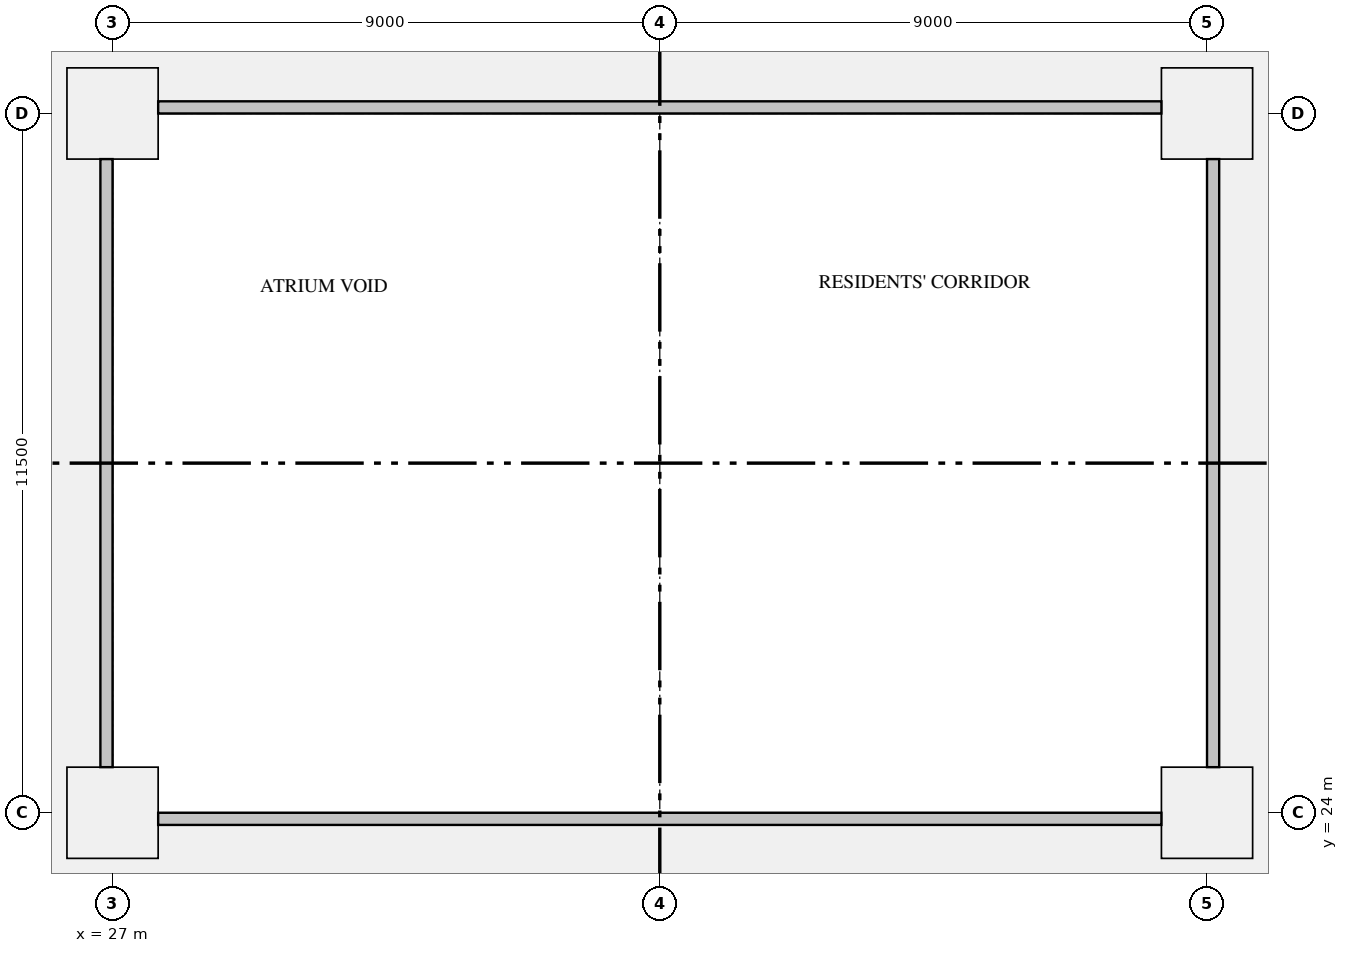
"""IFC4 building model, lengths in metres.
Left out: names, types, materials, properties, quantities, classifications, styles, units other than length and angle.
Written with IfcOpenShell. Run it as: python <this file> out.ifc"""

import sys

from ifc_helpers import new_model, si_unit, direction, frame, origin, origin_2d, place, context, subcontext, project, spatial, rectangle, extrude, element, save


model = new_model("IFC4")
c1 = context("Model", 3, precision=1e-05, world=origin(), true_north=direction((0.0, 1.0)))
c2 = subcontext(c1, "Body", "Model", "MODEL_VIEW")
j1 = project(units=[si_unit("LENGTHUNIT", "METRE"), si_unit("PLANEANGLEUNIT", "RADIAN")], contexts=[c1])
p1 = place(None, origin())
s1 = spatial("IfcSite", under=j1, at=p1, CompositionType="ELEMENT")
p2 = place(p1, origin())
s2 = spatial("IfcBuilding", under=s1, at=p2, CompositionType="ELEMENT")
p3 = place(p2, frame((0.0, 0.0, 66.75)))
s3 = spatial("IfcBuildingStorey", under=s2, at=p3, CompositionType="ELEMENT", Elevation=66.75)
for number, where, z_axis, x_axis in (
    (1, (27.0, 24.0, 0.0), (0.0, 0.0, 1.0), (1.0, 0.0, 0.0)),
    (2, (45.0, 24.0, 0.0), (0.0, 0.0, 1.0), (1.0, 0.0, 0.0)),
    (3, (27.0, 35.5, 0.0), (0.0, 0.0, 1.0), (1.0, 0.0, 0.0)),
    (4, (45.0, 35.5, 0.0), (0.0, 0.0, 1.0), (1.0, 0.0, 0.0)),
):
    element("IfcColumn", number, at=place(p3, frame(where, z_axis=z_axis, x_axis=x_axis)), inside=s3, PredefinedType="COLUMN", context=c2, shape_type="SweptSolid", body=[
        extrude(rectangle(XDim=1.5, YDim=1.5, at=origin_2d()), origin(), (0.0, 0.0, 1.0), 3.15),
    ])
save(model, sys.argv[1])
